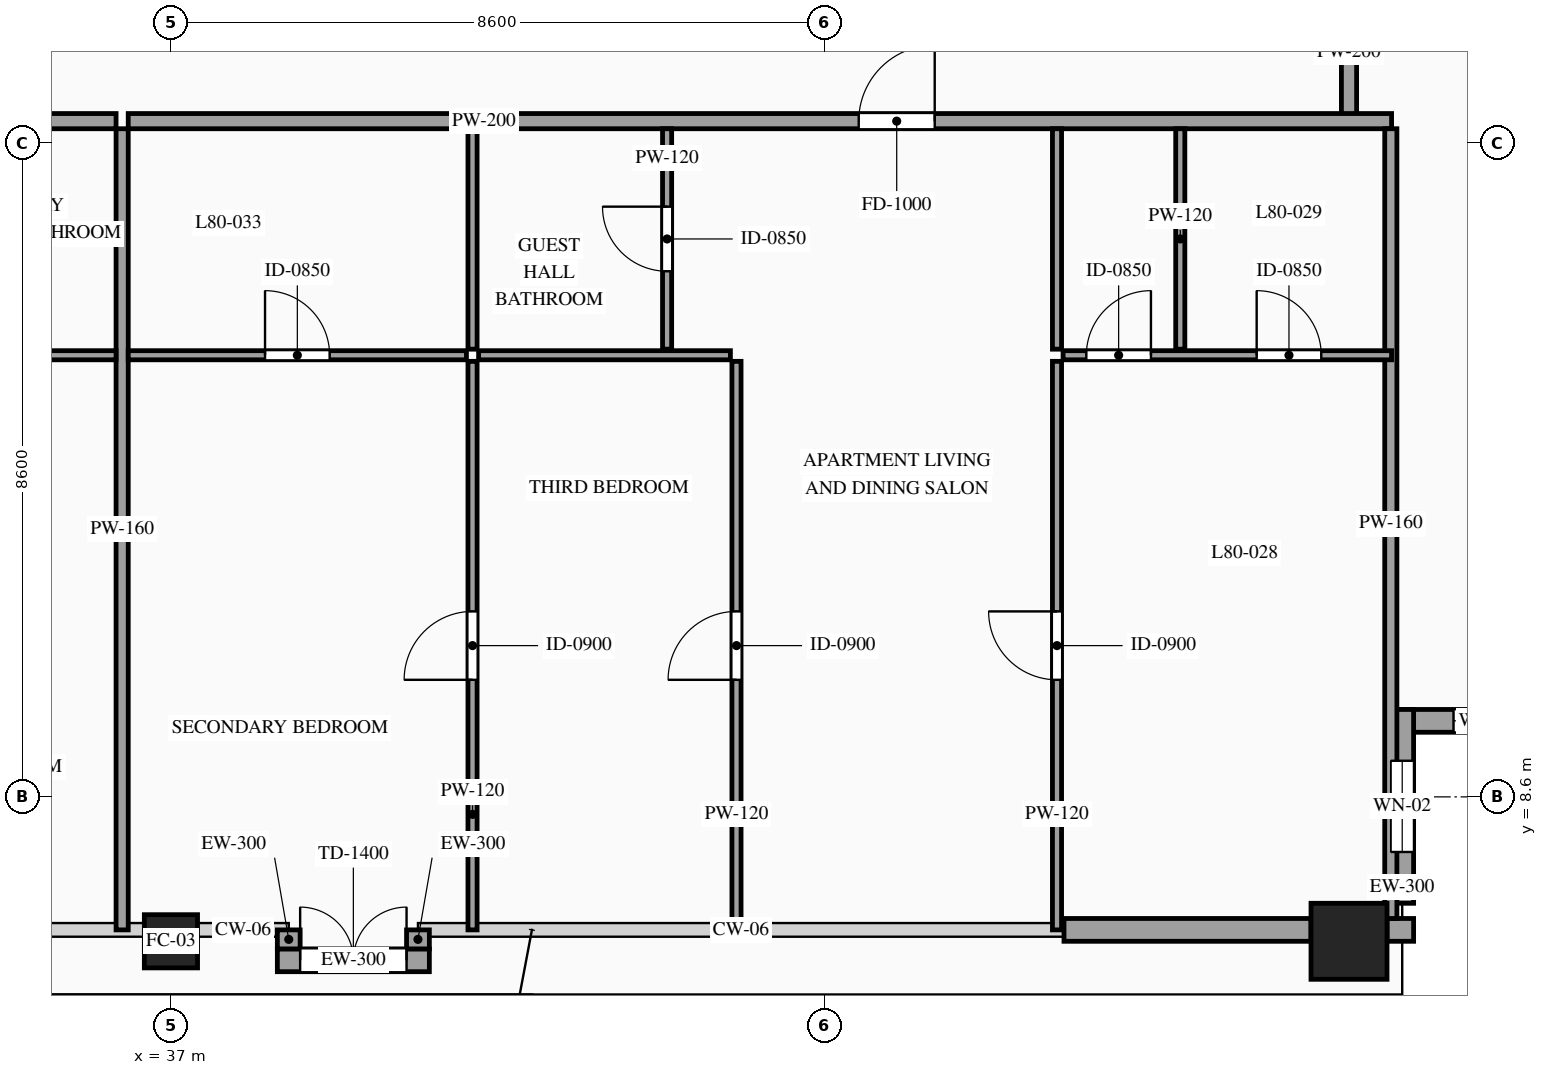
"""IFC4 building model, lengths in metres.
Left out: names, types, materials, properties, quantities, classifications, styles, units other than length and angle.
Written with IfcOpenShell. Run it as: python <this file> out.ifc"""

import sys

from ifc_helpers import new_model, si_unit, direction, frame, frame_2d, origin, origin_2d, place, context, subcontext, project, spatial, rectangle, hollow_rectangle, extrude, source, transform, mapped, element, fill, save


model = new_model("IFC4")
c1 = context("Model", 3, precision=1e-05, world=origin(), true_north=direction((0.0, 1.0)))
c2 = subcontext(c1, "Body", "Model", "MODEL_VIEW")
j1 = project(units=[si_unit("LENGTHUNIT", "METRE"), si_unit("PLANEANGLEUNIT", "RADIAN")], contexts=[c1])
p1 = place(None, origin())
s1 = spatial("IfcSite", under=j1, at=p1, CompositionType="ELEMENT")
p2 = place(p1, origin())
s2 = spatial("IfcBuilding", under=s1, at=p2, CompositionType="ELEMENT")
p3 = place(p2, frame((0.0, 0.0, 299.6)))
s3 = spatial("IfcBuildingStorey", under=s2, at=p3, CompositionType="ELEMENT", Elevation=299.6)
m1 = source(origin(), c2, "Body", "SweptSolid", [
    extrude(hollow_rectangle(XDim=0.7, YDim=0.7, WallThickness=0.032, at=origin_2d()), origin(), (0.0, 0.0, 1.0), 3.5),
])
p4 = place(p3, frame((37.0, 6.7, 0.0), z_axis=(0.0, 0.0, 1.0), x_axis=(1.0, 0.0, 0.0)))
e1 = element("IfcColumn", 1, at=p4, inside=s3, PredefinedType="COLUMN", context=c2, shape_type="MappedRepresentation", body=[
    mapped(m1, transform((0.0, 0.0, 0.0), scale=1.0)),
])
m2 = source(origin(), c2, "Body", "SweptSolid", [
    extrude(hollow_rectangle(XDim=1.0, YDim=1.0, WallThickness=0.048, at=origin_2d()), origin(), (0.0, 0.0, 1.0), 3.5),
])
p5 = place(p3, frame((52.5, 6.7, 0.0), z_axis=(0.0, 0.0, 1.0), x_axis=(1.0, 0.0, 0.0)))
e2 = element("IfcColumn", 2, at=p5, inside=s3, PredefinedType="COLUMN", context=c2, shape_type="MappedRepresentation", body=[
    mapped(m2, transform((0.0, 0.0, 0.0), scale=1.0)),
])
p6 = place(p3, frame((53.05, 9.6, 0.0), z_axis=(0.0, 0.0, 1.0), x_axis=(1.0, 0.0, 0.0)))
e3 = element("IfcWall", 3, at=p6, inside=s3, PredefinedType="SOLIDWALL", context=c2, shape_type="SweptSolid", body=[
    extrude(rectangle(XDim=2.55, YDim=0.3, at=frame_2d((1.275, 0.0))), origin(), (0.0, 0.0, 1.0), 3.28),
])
p7 = place(p6, frame((0.825, 0.0, 0.85)))
e4 = element("IfcOpeningElement", 4, at=p7, cuts=e3, PredefinedType="OPENING", context=c2, shape_type="SweptSolid", body=[
    extrude(rectangle(XDim=0.9, YDim=1.5, at=frame_2d((0.45, 0.75))), frame((0.0, 0.165, 0.0), z_axis=(0.0, -1.0, 0.0), x_axis=(1.0, 0.0, 0.0)), (0.0, 0.0, 1.0), 0.33),
])
p8 = place(p3, frame((53.2, 7.2, 0.0), z_axis=(0.0, 0.0, 1.0), x_axis=(0.0, 1.0, 0.0)))
e5 = element("IfcWall", 5, at=p8, inside=s3, PredefinedType="SOLIDWALL", context=c2, shape_type="SweptSolid", body=[
    extrude(rectangle(XDim=2.55, YDim=0.3, at=frame_2d((1.275, 0.0))), origin(), (0.0, 0.0, 1.0), 3.28),
])
p9 = place(p8, frame((0.675, 0.0, 0.85)))
e6 = element("IfcOpeningElement", 6, at=p9, cuts=e5, PredefinedType="OPENING", context=c2, shape_type="SweptSolid", body=[
    extrude(rectangle(XDim=1.2, YDim=2.1, at=frame_2d((0.6, 1.05))), frame((0.0, 0.165, 0.0), z_axis=(0.0, -1.0, 0.0), x_axis=(1.0, 0.0, 0.0)), (0.0, 0.0, 1.0), 0.33),
])
m3 = source(origin(), c2, "Body", "SweptSolid", [
    extrude(rectangle(XDim=0.35, YDim=0.3, at=frame_2d((0.175, 0.0))), origin(), (0.0, 0.0, 1.0), 3.28),
])
p10 = place(p3, frame((53.0, 6.85, 0.0), z_axis=(0.0, 0.0, 1.0), x_axis=(1.0, 0.0, 0.0)))
e7 = element("IfcWall", 7, at=p10, inside=s3, PredefinedType="SOLIDWALL", context=c2, shape_type="MappedRepresentation", body=[
    mapped(m3, transform((0.0, 0.0, 0.0), scale=1.0)),
])
m4 = source(origin(), c2, "Body", "SweptSolid", [
    extrude(rectangle(XDim=3.25, YDim=0.3, at=frame_2d((1.625, 0.0))), origin(), (0.0, 0.0, 1.0), 2.885),
])
p11 = place(p3, frame((48.75, 6.85, 0.0), z_axis=(0.0, 0.0, 1.0), x_axis=(1.0, 0.0, 0.0)))
e8 = element("IfcWall", 8, at=p11, inside=s3, PredefinedType="SOLIDWALL", context=c2, shape_type="MappedRepresentation", body=[
    mapped(m4, transform((0.0, 0.0, 0.0), scale=1.0)),
])
p12 = place(p3, frame((38.4, 6.45, 0.0), z_axis=(0.0, 0.0, 1.0), x_axis=(1.0, 0.0, 0.0)))
e9 = element("IfcWall", 9, at=p12, inside=s3, PredefinedType="SOLIDWALL", context=c2, shape_type="SweptSolid", body=[
    extrude(rectangle(XDim=2.0, YDim=0.3, at=frame_2d((1.0, 0.0))), origin(), (0.0, 0.0, 1.0), 2.885),
])
p13 = place(p12, frame((0.3, 0.0, 0.0)))
e10 = element("IfcOpeningElement", 10, at=p13, cuts=e9, PredefinedType="OPENING", context=c2, shape_type="SweptSolid", body=[
    extrude(rectangle(XDim=1.4, YDim=2.3, at=frame_2d((0.7, 1.15))), frame((0.0, 0.165, 0.0), z_axis=(0.0, -1.0, 0.0), x_axis=(1.0, 0.0, 0.0)), (0.0, 0.0, 1.0), 0.33),
])
m5 = source(origin(), c2, "Body", "SweptSolid", [
    extrude(rectangle(XDim=0.25, YDim=0.3, at=frame_2d((0.125, 0.0))), origin(), (0.0, 0.0, 1.0), 3.28),
])
for number, where, z_axis, x_axis in (
    (11, (38.55, 6.85, 0.0), (0.0, 0.0, 1.0), (0.0, -1.0, 0.0)),
    (12, (40.25, 6.6, 0.0), (0.0, 0.0, 1.0), (0.0, 1.0, 0.0)),
):
    element("IfcWall", number, at=place(p3, frame(where, z_axis=z_axis, x_axis=x_axis)), inside=s3, PredefinedType="SOLIDWALL", context=c2, shape_type="MappedRepresentation", body=[
        mapped(m5, transform((0.0, 0.0, 0.0), scale=1.0)),
    ])
m6 = source(origin(), c2, "Body", "SweptSolid", [
    extrude(rectangle(XDim=1.7, YDim=0.2, at=frame_2d((0.85, 0.0))), origin(), (0.0, 0.0, 1.0), 3.28),
])
p14 = place(p3, frame((52.5, 17.55, 0.0), z_axis=(0.0, 0.0, 1.0), x_axis=(0.0, 1.0, 0.0)))
e13 = element("IfcWall", 13, at=p14, inside=s3, PredefinedType="PARTITIONING", context=c2, shape_type="MappedRepresentation", body=[
    mapped(m6, transform((0.0, 0.0, 0.0), scale=1.0)),
])
p15 = place(p3, frame((20.94, 17.49, 0.0), z_axis=(0.0, 0.0, 1.0), x_axis=(1.0, 0.0, 0.0)))
e14 = element("IfcWall", 14, at=p15, inside=s3, PredefinedType="PARTITIONING", context=c2, shape_type="SweptSolid", body=[
    extrude(rectangle(XDim=15.338, YDim=0.2, at=frame_2d((7.669, 0.0))), origin(), (0.0, 0.0, 1.0), 3.28),
])
p16 = place(p15, frame((8.927, 0.0, 0.0)))
e15 = element("IfcOpeningElement", 15, at=p16, cuts=e14, PredefinedType="OPENING", context=c2, shape_type="SweptSolid", body=[
    extrude(rectangle(XDim=1.0, YDim=2.2, at=frame_2d((0.5, 1.1))), frame((0.0, 0.115, 0.0), z_axis=(0.0, -1.0, 0.0), x_axis=(1.0, 0.0, 0.0)), (0.0, 0.0, 1.0), 0.23),
])
m7 = source(origin(), c2, "Body", "SweptSolid", [
    extrude(rectangle(XDim=10.54, YDim=0.16, at=frame_2d((5.27, 0.0))), origin(), (0.0, 0.0, 1.0), 3.28),
])
p17 = place(p3, frame((36.358, 6.85, 0.0), z_axis=(0.0, 0.0, 1.0), x_axis=(0.0, 1.0, 0.0)))
e16 = element("IfcWall", 16, at=p17, inside=s3, PredefinedType="PARTITIONING", context=c2, shape_type="MappedRepresentation", body=[
    mapped(m7, transform((0.0, 0.0, 0.0), scale=1.0)),
])
p18 = place(p3, frame((32.29, 14.41, 0.0), z_axis=(0.0, 0.0, 1.0), x_axis=(1.0, 0.0, 0.0)))
e17 = element("IfcWall", 17, at=p18, inside=s3, PredefinedType="PARTITIONING", context=c2, shape_type="SweptSolid", body=[
    extrude(rectangle(XDim=3.988, YDim=0.12, at=frame_2d((1.994, 0.0))), origin(), (0.0, 0.0, 1.0), 3.28),
])
p19 = place(p18, frame((1.569, 0.0, 0.0)))
e18 = element("IfcOpeningElement", 18, at=p19, cuts=e17, PredefinedType="OPENING", context=c2, shape_type="SweptSolid", body=[
    extrude(rectangle(XDim=0.85, YDim=2.1, at=frame_2d((0.425, 1.05))), frame((0.0, 0.075, 0.0), z_axis=(0.0, -1.0, 0.0), x_axis=(1.0, 0.0, 0.0)), (0.0, 0.0, 1.0), 0.15),
])
p20 = place(p3, frame((36.438, 17.49, 0.0), z_axis=(0.0, 0.0, 1.0), x_axis=(1.0, 0.0, 0.0)))
e19 = element("IfcWall", 19, at=p20, inside=s3, PredefinedType="PARTITIONING", context=c2, shape_type="SweptSolid", body=[
    extrude(rectangle(XDim=16.622, YDim=0.2, at=frame_2d((8.311, 0.0))), origin(), (0.0, 0.0, 1.0), 3.28),
])
p21 = place(p20, frame((9.611, 0.0, 0.0)))
e20 = element("IfcOpeningElement", 20, at=p21, cuts=e19, PredefinedType="OPENING", context=c2, shape_type="SweptSolid", body=[
    extrude(rectangle(XDim=1.0, YDim=2.2, at=frame_2d((0.5, 1.1))), frame((0.0, 0.115, 0.0), z_axis=(0.0, -1.0, 0.0), x_axis=(1.0, 0.0, 0.0)), (0.0, 0.0, 1.0), 0.23),
])
m8 = source(origin(), c2, "Body", "SweptSolid", [
    extrude(rectangle(XDim=10.39, YDim=0.16, at=frame_2d((5.195, 0.0))), origin(), (0.0, 0.0, 1.0), 3.28),
])
p22 = place(p3, frame((53.05, 7.0, 0.0), z_axis=(0.0, 0.0, 1.0), x_axis=(0.0, 1.0, 0.0)))
e21 = element("IfcWall", 21, at=p22, inside=s3, PredefinedType="PARTITIONING", context=c2, shape_type="MappedRepresentation", body=[
    mapped(m8, transform((0.0, 0.0, 0.0), scale=1.0)),
])
p23 = place(p3, frame((36.438, 14.41, 0.0), z_axis=(0.0, 0.0, 1.0), x_axis=(1.0, 0.0, 0.0)))
e22 = element("IfcWall", 22, at=p23, inside=s3, PredefinedType="PARTITIONING", context=c2, shape_type="SweptSolid", body=[
    extrude(rectangle(XDim=4.45, YDim=0.12, at=frame_2d((2.225, 0.0))), origin(), (0.0, 0.0, 1.0), 3.28),
])
p24 = place(p23, frame((1.8, 0.0, 0.0)))
e23 = element("IfcOpeningElement", 23, at=p24, cuts=e22, PredefinedType="OPENING", context=c2, shape_type="SweptSolid", body=[
    extrude(rectangle(XDim=0.85, YDim=2.1, at=frame_2d((0.425, 1.05))), frame((0.0, 0.075, 0.0), z_axis=(0.0, -1.0, 0.0), x_axis=(1.0, 0.0, 0.0)), (0.0, 0.0, 1.0), 0.15),
])
m9 = source(origin(), c2, "Body", "SweptSolid", [
    extrude(rectangle(XDim=2.9, YDim=0.12, at=frame_2d((1.45, 0.0))), origin(), (0.0, 0.0, 1.0), 3.28),
])
p25 = place(p3, frame((40.968, 14.49, 0.0), z_axis=(0.0, 0.0, 1.0), x_axis=(0.0, 1.0, 0.0)))
e24 = element("IfcWall", 24, at=p25, inside=s3, PredefinedType="PARTITIONING", context=c2, shape_type="MappedRepresentation", body=[
    mapped(m9, transform((0.0, 0.0, 0.0), scale=1.0)),
])
p26 = place(p3, frame((43.528, 14.49, 0.0), z_axis=(0.0, 0.0, 1.0), x_axis=(0.0, 1.0, 0.0)))
e25 = element("IfcWall", 25, at=p26, inside=s3, PredefinedType="PARTITIONING", context=c2, shape_type="SweptSolid", body=[
    extrude(rectangle(XDim=2.9, YDim=0.12, at=frame_2d((1.45, 0.0))), origin(), (0.0, 0.0, 1.0), 3.28),
])
p27 = place(p26, frame((1.025, 0.0, 0.0)))
e26 = element("IfcOpeningElement", 26, at=p27, cuts=e25, PredefinedType="OPENING", context=c2, shape_type="SweptSolid", body=[
    extrude(rectangle(XDim=0.85, YDim=2.1, at=frame_2d((0.425, 1.05))), frame((0.0, 0.075, 0.0), z_axis=(0.0, -1.0, 0.0), x_axis=(1.0, 0.0, 0.0)), (0.0, 0.0, 1.0), 0.15),
])
m10 = source(origin(), c2, "Body", "SweptSolid", [
    extrude(rectangle(XDim=2.9, YDim=0.12, at=frame_2d((1.45, 0.0))), origin(), (0.0, 0.0, 1.0), 2.825),
])
p28 = place(p3, frame((50.28, 14.49, 0.0), z_axis=(0.0, 0.0, 1.0), x_axis=(0.0, 1.0, 0.0)))
e27 = element("IfcWall", 27, at=p28, inside=s3, PredefinedType="PARTITIONING", context=c2, shape_type="MappedRepresentation", body=[
    mapped(m10, transform((0.0, 0.0, 0.0), scale=1.0)),
])
p29 = place(p3, frame((48.658, 14.49, 0.0), z_axis=(0.0, 0.0, 1.0), x_axis=(0.0, 1.0, 0.0)))
e28 = element("IfcWall", 28, at=p29, inside=s3, PredefinedType="PARTITIONING", context=c2, shape_type="MappedRepresentation", body=[
    mapped(m9, transform((0.0, 0.0, 0.0), scale=1.0)),
])
p30 = place(p3, frame((40.968, 6.85, 0.0), z_axis=(0.0, 0.0, 1.0), x_axis=(0.0, 1.0, 0.0)))
e29 = element("IfcWall", 29, at=p30, inside=s3, PredefinedType="PARTITIONING", context=c2, shape_type="SweptSolid", body=[
    extrude(rectangle(XDim=7.48, YDim=0.12, at=frame_2d((3.74, 0.0))), origin(), (0.0, 0.0, 1.0), 3.28),
])
p31 = place(p30, frame((3.29, 0.0, 0.0)))
e30 = element("IfcOpeningElement", 30, at=p31, cuts=e29, PredefinedType="OPENING", context=c2, shape_type="SweptSolid", body=[
    extrude(rectangle(XDim=0.9, YDim=2.15, at=frame_2d((0.45, 1.075))), frame((0.0, 0.075, 0.0), z_axis=(0.0, -1.0, 0.0), x_axis=(1.0, 0.0, 0.0)), (0.0, 0.0, 1.0), 0.15),
])
p32 = place(p3, frame((48.738, 14.41, 0.0), z_axis=(0.0, 0.0, 1.0), x_axis=(1.0, 0.0, 0.0)))
e31 = element("IfcWall", 31, at=p32, inside=s3, PredefinedType="PARTITIONING", context=c2, shape_type="SweptSolid", body=[
    extrude(rectangle(XDim=4.322, YDim=0.12, at=frame_2d((2.161, 0.0))), origin(), (0.0, 0.0, 1.0), 3.28),
])
p33 = place(p32, frame((2.547, 0.0, 0.0)))
e32 = element("IfcOpeningElement", 32, at=p33, cuts=e31, PredefinedType="OPENING", context=c2, shape_type="SweptSolid", body=[
    extrude(rectangle(XDim=0.85, YDim=2.1, at=frame_2d((0.425, 1.05))), frame((0.0, 0.075, 0.0), z_axis=(0.0, -1.0, 0.0), x_axis=(1.0, 0.0, 0.0)), (0.0, 0.0, 1.0), 0.15),
])
p34 = place(p32, frame((0.306, 0.0, 0.0)))
e33 = element("IfcOpeningElement", 33, at=p34, cuts=e31, PredefinedType="OPENING", context=c2, shape_type="SweptSolid", body=[
    extrude(rectangle(XDim=0.85, YDim=2.1, at=frame_2d((0.425, 1.05))), frame((0.0, 0.075, 0.0), z_axis=(0.0, -1.0, 0.0), x_axis=(1.0, 0.0, 0.0)), (0.0, 0.0, 1.0), 0.15),
])
p35 = place(p3, frame((48.658, 6.85, 0.0), z_axis=(0.0, 0.0, 1.0), x_axis=(0.0, 1.0, 0.0)))
e34 = element("IfcWall", 34, at=p35, inside=s3, PredefinedType="PARTITIONING", context=c2, shape_type="SweptSolid", body=[
    extrude(rectangle(XDim=7.48, YDim=0.12, at=frame_2d((3.74, 0.0))), origin(), (0.0, 0.0, 1.0), 3.28),
])
p36 = place(p35, frame((3.29, 0.0, 0.0)))
e35 = element("IfcOpeningElement", 35, at=p36, cuts=e34, PredefinedType="OPENING", context=c2, shape_type="SweptSolid", body=[
    extrude(rectangle(XDim=0.9, YDim=2.15, at=frame_2d((0.45, 1.075))), frame((0.0, 0.075, 0.0), z_axis=(0.0, -1.0, 0.0), x_axis=(1.0, 0.0, 0.0)), (0.0, 0.0, 1.0), 0.15),
])
m11 = source(origin(), c2, "Body", "SweptSolid", [
    extrude(rectangle(XDim=3.313, YDim=0.12, at=frame_2d((1.656, 0.0))), origin(), (0.0, 0.0, 1.0), 3.28),
])
p37 = place(p3, frame((41.048, 14.41, 0.0), z_axis=(0.0, 0.0, 1.0), x_axis=(1.0, 0.0, 0.0)))
e36 = element("IfcWall", 36, at=p37, inside=s3, PredefinedType="PARTITIONING", context=c2, shape_type="MappedRepresentation", body=[
    mapped(m11, transform((0.0, 0.0, 0.0), scale=1.0)),
])
p38 = place(p3, frame((44.441, 6.85, 0.0), z_axis=(0.0, 0.0, 1.0), x_axis=(0.0, 1.0, 0.0)))
e37 = element("IfcWall", 37, at=p38, inside=s3, PredefinedType="PARTITIONING", context=c2, shape_type="SweptSolid", body=[
    extrude(rectangle(XDim=7.48, YDim=0.12, at=frame_2d((3.74, 0.0))), origin(), (0.0, 0.0, 1.0), 3.28),
])
p39 = place(p38, frame((3.29, 0.0, 0.0)))
e38 = element("IfcOpeningElement", 38, at=p39, cuts=e37, PredefinedType="OPENING", context=c2, shape_type="SweptSolid", body=[
    extrude(rectangle(XDim=0.9, YDim=2.15, at=frame_2d((0.45, 1.075))), frame((0.0, 0.075, 0.0), z_axis=(0.0, -1.0, 0.0), x_axis=(1.0, 0.0, 0.0)), (0.0, 0.0, 1.0), 0.15),
])
m12 = source(origin(), c2, "Body", "SweptSolid", [
    extrude(rectangle(XDim=0.9, YDim=1.5, at=frame_2d((0.45, 0.75))), frame((0.0, 0.03, 0.0), z_axis=(0.0, -1.0, 0.0), x_axis=(1.0, 0.0, 0.0)), (0.0, 0.0, 1.0), 0.06),
])
p40 = place(p7, origin())
e39 = element("IfcWindow", 39, at=p40, inside=s3, PartitioningType="SINGLE_PANEL", PredefinedType="WINDOW", context=c2, shape_type="MappedRepresentation", body=[
    mapped(m12, transform((0.0, 0.0, 0.0), scale=1.0)),
])
fill(e4, e39)
m13 = source(origin(), c2, "Body", "SweptSolid", [
    extrude(rectangle(XDim=1.2, YDim=2.1, at=frame_2d((0.6, 1.05))), frame((0.0, 0.03, 0.0), z_axis=(0.0, -1.0, 0.0), x_axis=(1.0, 0.0, 0.0)), (0.0, 0.0, 1.0), 0.06),
])
p41 = place(p9, origin())
e40 = element("IfcWindow", 40, at=p41, inside=s3, PartitioningType="SINGLE_PANEL", PredefinedType="WINDOW", context=c2, shape_type="MappedRepresentation", body=[
    mapped(m13, transform((0.0, 0.0, 0.0), scale=1.0)),
])
fill(e6, e40)
m14 = source(origin(), c2, "Body", "SweptSolid", [
    extrude(rectangle(XDim=1.4, YDim=2.3, at=frame_2d((0.7, 1.15))), frame((0.0, 0.025, 0.0), z_axis=(0.0, -1.0, 0.0), x_axis=(1.0, 0.0, 0.0)), (0.0, 0.0, 1.0), 0.05),
])
p42 = place(p13, origin())
e41 = element("IfcDoor", 41, at=p42, inside=s3, OperationType="DOUBLE_DOOR_SINGLE_SWING", PredefinedType="DOOR", context=c2, shape_type="MappedRepresentation", body=[
    mapped(m14, transform((0.0, 0.0, 0.0), scale=1.0)),
])
fill(e10, e41)
m15 = source(origin(), c2, "Body", "SweptSolid", [
    extrude(rectangle(XDim=1.0, YDim=2.2, at=frame_2d((0.5, 1.1))), frame((0.0, 0.025, 0.0), z_axis=(0.0, -1.0, 0.0), x_axis=(1.0, 0.0, 0.0)), (0.0, 0.0, 1.0), 0.05),
])
p43 = place(p21, origin())
e42 = element("IfcDoor", 42, at=p43, inside=s3, OperationType="SINGLE_SWING_RIGHT", PredefinedType="DOOR", context=c2, shape_type="MappedRepresentation", body=[
    mapped(m15, transform((0.0, 0.0, 0.0), scale=1.0)),
])
fill(e20, e42)
m16 = source(origin(), c2, "Body", "SweptSolid", [
    extrude(rectangle(XDim=0.85, YDim=2.1, at=frame_2d((0.425, 1.05))), frame((0.0, 0.025, 0.0), z_axis=(0.0, -1.0, 0.0), x_axis=(1.0, 0.0, 0.0)), (0.0, 0.0, 1.0), 0.05),
])
p44 = place(p24, origin())
e43 = element("IfcDoor", 43, at=p44, inside=s3, OperationType="SINGLE_SWING_LEFT", PredefinedType="DOOR", context=c2, shape_type="MappedRepresentation", body=[
    mapped(m16, transform((0.0, 0.0, 0.0), scale=1.0)),
])
fill(e23, e43)
p45 = place(p27, origin())
e44 = element("IfcDoor", 44, at=p45, inside=s3, OperationType="SINGLE_SWING_RIGHT", PredefinedType="DOOR", context=c2, shape_type="MappedRepresentation", body=[
    mapped(m16, transform((0.0, 0.0, 0.0), scale=1.0)),
])
fill(e26, e44)
p46 = place(p33, origin())
e45 = element("IfcDoor", 45, at=p46, inside=s3, OperationType="SINGLE_SWING_LEFT", PredefinedType="DOOR", context=c2, shape_type="MappedRepresentation", body=[
    mapped(m16, transform((0.0, 0.0, 0.0), scale=1.0)),
])
fill(e32, e45)
p47 = place(p34, origin())
e46 = element("IfcDoor", 46, at=p47, inside=s3, OperationType="SINGLE_SWING_RIGHT", PredefinedType="DOOR", context=c2, shape_type="MappedRepresentation", body=[
    mapped(m16, transform((0.0, 0.0, 0.0), scale=1.0)),
])
fill(e33, e46)
m17 = source(origin(), c2, "Body", "SweptSolid", [
    extrude(rectangle(XDim=0.9, YDim=2.15, at=frame_2d((0.45, 1.075))), frame((0.0, 0.025, 0.0), z_axis=(0.0, -1.0, 0.0), x_axis=(1.0, 0.0, 0.0)), (0.0, 0.0, 1.0), 0.05),
])
p48 = place(p31, origin())
e47 = element("IfcDoor", 47, at=p48, inside=s3, OperationType="SINGLE_SWING_LEFT", PredefinedType="DOOR", context=c2, shape_type="MappedRepresentation", body=[
    mapped(m17, transform((0.0, 0.0, 0.0), scale=1.0)),
])
fill(e30, e47)
p49 = place(p36, origin())
e48 = element("IfcDoor", 48, at=p49, inside=s3, OperationType="SINGLE_SWING_RIGHT", PredefinedType="DOOR", context=c2, shape_type="MappedRepresentation", body=[
    mapped(m17, transform((0.0, 0.0, 0.0), scale=1.0)),
])
fill(e35, e48)
p50 = place(p39, origin())
e49 = element("IfcDoor", 49, at=p50, inside=s3, OperationType="SINGLE_SWING_LEFT", PredefinedType="DOOR", context=c2, shape_type="MappedRepresentation", body=[
    mapped(m17, transform((0.0, 0.0, 0.0), scale=1.0)),
])
fill(e38, e49)
save(model, sys.argv[1])
